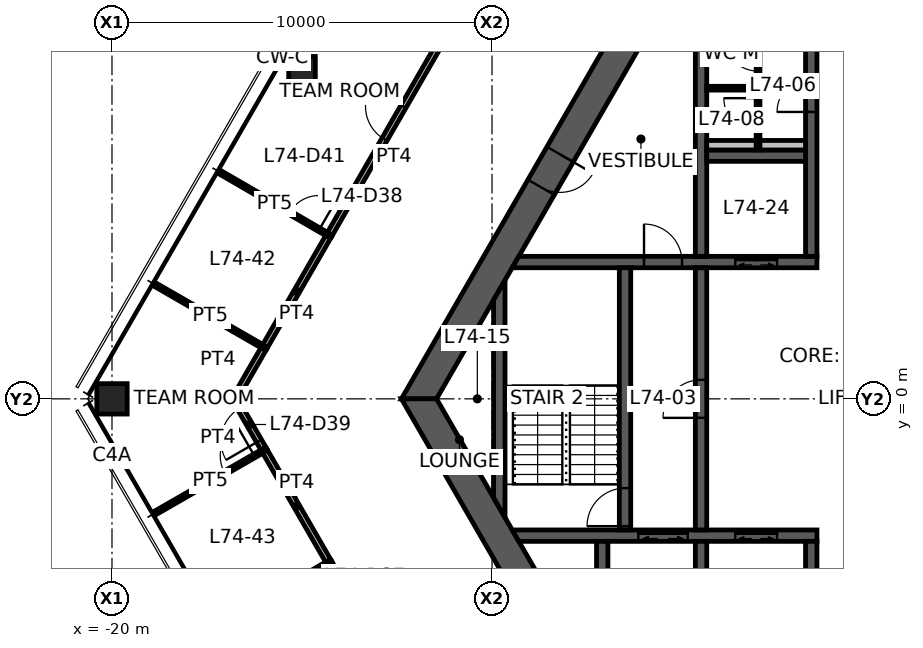
"""IFC4 building model, lengths in metres.
Left out: names, types, materials, properties, quantities, classifications, styles, units other than length and angle.
Written with IfcOpenShell. Run it as: python <this file> out.ifc"""

import sys

from ifc_helpers import new_model, si_unit, direction, frame, frame_2d, origin, origin_2d, place, context, subcontext, project, spatial, polyline, rectangle, hollow_rectangle, outline, extrude, element, fill, save


model = new_model("IFC4")
c1 = context("Model", 3, precision=1e-05, world=origin(), true_north=direction((0.0, 1.0)))
c2 = subcontext(c1, "Body", "Model", "MODEL_VIEW")
j1 = project(units=[si_unit("LENGTHUNIT", "METRE"), si_unit("PLANEANGLEUNIT", "RADIAN")], contexts=[c1])
p1 = place(None, origin())
s1 = spatial("IfcSite", under=j1, at=p1, CompositionType="ELEMENT")
p2 = place(p1, origin())
s2 = spatial("IfcBuilding", under=s1, at=p2, CompositionType="ELEMENT")
p3 = place(p2, frame((0.0, 0.0, 294.7)))
s3 = spatial("IfcBuildingStorey", under=s2, at=p3, CompositionType="ELEMENT", Elevation=294.7)
p4 = place(p3, frame((-20.0, 0.0, 0.0), z_axis=(0.0, 0.0, 1.0), x_axis=(1.0, 0.0, 0.0)))
e1 = element("IfcColumn", 1, at=p4, inside=s3, PredefinedType="COLUMN", context=c2, shape_type="SweptSolid", body=[
    extrude(hollow_rectangle(XDim=0.8, YDim=0.8, WallThickness=0.04, at=origin_2d()), origin(), (0.0, 0.0, 1.0), 3.9),
])
p5 = place(p3, frame((-15.0, 8.66, 0.0), z_axis=(0.0, 0.0, 1.0), x_axis=(1.0, 0.0, 0.0)))
e2 = element("IfcColumn", 2, at=p5, inside=s3, PredefinedType="COLUMN", context=c2, shape_type="SweptSolid", body=[
    extrude(hollow_rectangle(XDim=0.7, YDim=0.7, WallThickness=0.032, at=origin_2d()), origin(), (0.0, 0.0, 1.0), 3.9),
])
p6 = place(p3, frame((-5.961, 10.325, 0.0), z_axis=(0.0, 0.0, 1.0), x_axis=(-0.500004296715, -0.866022923061, 0.0)))
e3 = element("IfcWall", 3, at=p6, inside=s3, PredefinedType="SHEAR", context=c2, shape_type="SweptSolid", body=[
    extrude(outline(polyline([(-0.231, -0.4), (4.494, -0.4), (5.494, -0.4), (12.153, -0.4), (11.691, 0.4), (5.494, 0.4), (4.494, 0.4), (0.231, 0.4), (-0.231, -0.4)])), origin(), (0.0, 0.0, 1.0), 3.9),
])
p7 = place(p6, frame((4.494, 0.0, 0.0)))
e4 = element("IfcOpeningElement", 4, at=p7, cuts=e3, PredefinedType="OPENING", context=c2, shape_type="SweptSolid", body=[
    extrude(rectangle(XDim=1.0, YDim=2.1, at=frame_2d((0.5, 1.05))), frame((0.0, 0.41, 0.0), z_axis=(0.0, -1.0, 0.0), x_axis=(1.0, 0.0, 0.0)), (0.0, 0.0, 1.0), 0.82),
])
p8 = place(p3, frame((-11.922, 0.0, 0.0), z_axis=(0.0, 0.0, 1.0), x_axis=(0.500004296715, -0.866022923061, 0.0)))
e5 = element("IfcWall", 5, at=p8, inside=s3, PredefinedType="SHEAR", context=c2, shape_type="SweptSolid", body=[
    extrude(outline(polyline([(-0.231, -0.4), (6.281, -0.4), (7.081, -0.4), (12.153, -0.4), (11.691, 0.4), (7.081, 0.4), (6.281, 0.4), (0.231, 0.4), (-0.231, -0.4)])), origin(), (0.0, 0.0, 1.0), 3.9),
])
p9 = place(p8, frame((6.281, 0.0, 0.0)))
e6 = element("IfcOpeningElement", 6, at=p9, cuts=e5, PredefinedType="OPENING", context=c2, shape_type="SweptSolid", body=[
    extrude(rectangle(XDim=0.8, YDim=2.1, at=frame_2d((0.4, 1.05))), frame((0.0, 0.41, 0.0), z_axis=(0.0, -1.0, 0.0), x_axis=(1.0, 0.0, 0.0)), (0.0, 0.0, 1.0), 0.82),
])
p10 = place(p3, frame((-9.382, 3.6, 0.0), z_axis=(0.0, 0.0, 1.0), x_axis=(1.0, 0.0, 0.0)))
e7 = element("IfcWall", 7, at=p10, inside=s3, PredefinedType="SHEAR", context=c2, shape_type="SweptSolid", body=[
    extrude(outline(polyline([(-0.087, -0.15), (3.382, -0.15), (4.382, -0.15), (5.782, -0.15), (6.882, -0.15), (7.932, -0.15), (7.932, 0.15), (6.882, 0.15), (5.782, 0.15), (4.382, 0.15), (3.382, 0.15), (0.087, 0.15), (-0.087, -0.15)])), origin(), (0.0, 0.0, 1.0), 3.9),
])
p11 = place(p10, frame((3.382, 0.0, 0.0)))
e8 = element("IfcOpeningElement", 8, at=p11, cuts=e7, PredefinedType="OPENING", context=c2, shape_type="SweptSolid", body=[
    extrude(rectangle(XDim=1.0, YDim=2.1, at=frame_2d((0.5, 1.05))), frame((0.0, 0.16, 0.0), z_axis=(0.0, -1.0, 0.0), x_axis=(1.0, 0.0, 0.0)), (0.0, 0.0, 1.0), 0.32),
])
p12 = place(p10, frame((5.782, 0.0, 0.0)))
e9 = element("IfcOpeningElement", 9, at=p12, cuts=e7, PredefinedType="OPENING", context=c2, shape_type="SweptSolid", body=[
    extrude(rectangle(XDim=1.1, YDim=2.1, at=frame_2d((0.55, 1.05))), frame((0.0, 0.16, 0.0), z_axis=(0.0, -1.0, 0.0), x_axis=(1.0, 0.0, 0.0)), (0.0, 0.0, 1.0), 0.32),
])
p13 = place(p3, frame((-9.382, -3.6, 0.0), z_axis=(0.0, 0.0, 1.0), x_axis=(1.0, 0.0, 0.0)))
e10 = element("IfcWall", 10, at=p13, inside=s3, PredefinedType="SHEAR", context=c2, shape_type="SweptSolid", body=[
    extrude(outline(polyline([(0.087, -0.15), (3.232, -0.15), (4.532, -0.15), (5.782, -0.15), (6.882, -0.15), (7.932, -0.15), (7.932, 0.15), (6.882, 0.15), (5.782, 0.15), (4.532, 0.15), (3.232, 0.15), (-0.087, 0.15), (0.087, -0.15)])), origin(), (0.0, 0.0, 1.0), 3.9),
])
p14 = place(p13, frame((5.782, 0.0, 0.0)))
e11 = element("IfcOpeningElement", 11, at=p14, cuts=e10, PredefinedType="OPENING", context=c2, shape_type="SweptSolid", body=[
    extrude(rectangle(XDim=1.1, YDim=2.1, at=frame_2d((0.55, 1.05))), frame((0.0, 0.16, 0.0), z_axis=(0.0, -1.0, 0.0), x_axis=(1.0, 0.0, 0.0)), (0.0, 0.0, 1.0), 0.32),
])
p15 = place(p13, frame((3.232, 0.0, 0.0)))
e12 = element("IfcOpeningElement", 12, at=p15, cuts=e10, PredefinedType="OPENING", context=c2, shape_type="SweptSolid", body=[
    extrude(rectangle(XDim=1.3, YDim=2.1, at=frame_2d((0.65, 1.05))), frame((0.0, 0.16, 0.0), z_axis=(0.0, -1.0, 0.0), x_axis=(1.0, 0.0, 0.0)), (0.0, 0.0, 1.0), 0.32),
])
p16 = place(p3, frame((-1.6, 3.75, 0.0), z_axis=(0.0, 0.0, 1.0), x_axis=(0.0, 1.0, 0.0)))
e13 = element("IfcWall", 13, at=p16, inside=s3, PredefinedType="SHEAR", context=c2, shape_type="SweptSolid", body=[
    extrude(rectangle(XDim=6.175, YDim=0.3, at=frame_2d((3.087, 0.0))), origin(), (0.0, 0.0, 1.0), 3.9),
])
p17 = place(p16, frame((3.8, 0.0, 0.0)))
e14 = element("IfcOpeningElement", 14, at=p17, cuts=e13, PredefinedType="OPENING", context=c2, shape_type="SweptSolid", body=[
    extrude(rectangle(XDim=0.9, YDim=2.1, at=frame_2d((0.45, 1.05))), frame((0.0, 0.16, 0.0), z_axis=(0.0, -1.0, 0.0), x_axis=(1.0, 0.0, 0.0)), (0.0, 0.0, 1.0), 0.32),
])
p18 = place(p3, frame((-1.6, -3.75, 0.0), z_axis=(0.0, 0.0, 1.0), x_axis=(0.0, -1.0, 0.0)))
e15 = element("IfcWall", 15, at=p18, inside=s3, PredefinedType="SHEAR", context=c2, shape_type="SweptSolid", body=[
    extrude(rectangle(XDim=6.175, YDim=0.3, at=frame_2d((3.087, 0.0))), origin(), (0.0, 0.0, 1.0), 3.9),
])
p19 = place(p18, frame((3.8, 0.0, 0.0)))
e16 = element("IfcOpeningElement", 16, at=p19, cuts=e15, PredefinedType="OPENING", context=c2, shape_type="SweptSolid", body=[
    extrude(rectangle(XDim=0.9, YDim=2.1, at=frame_2d((0.45, 1.05))), frame((0.0, 0.16, 0.0), z_axis=(0.0, -1.0, 0.0), x_axis=(1.0, 0.0, 0.0)), (0.0, 0.0, 1.0), 0.32),
])
p20 = place(p3, frame((-4.5, -3.45, 0.0), z_axis=(0.0, 0.0, 1.0), x_axis=(0.0, 1.0, 0.0)))
e17 = element("IfcWall", 17, at=p20, inside=s3, PredefinedType="SHEAR", context=c2, shape_type="SweptSolid", body=[
    extrude(rectangle(XDim=6.9, YDim=0.3, at=frame_2d((3.45, 0.0))), origin(), (0.0, 0.0, 1.0), 3.9),
])
p21 = place(p20, frame((2.95, 0.0, 0.0)))
e18 = element("IfcOpeningElement", 18, at=p21, cuts=e17, PredefinedType="OPENING", context=c2, shape_type="SweptSolid", body=[
    extrude(rectangle(XDim=1.0, YDim=2.1, at=frame_2d((0.5, 1.05))), frame((0.0, 0.16, 0.0), z_axis=(0.0, -1.0, 0.0), x_axis=(1.0, 0.0, 0.0)), (0.0, 0.0, 1.0), 0.32),
])
p22 = place(p3, frame((-6.5, -3.45, 0.0), z_axis=(0.0, 0.0, 1.0), x_axis=(0.0, 1.0, 0.0)))
e19 = element("IfcWall", 19, at=p22, inside=s3, PredefinedType="SHEAR", context=c2, shape_type="SweptSolid", body=[
    extrude(rectangle(XDim=6.9, YDim=0.3, at=frame_2d((3.45, 0.0))), origin(), (0.0, 0.0, 1.0), 3.9),
])
p23 = place(p22, frame((0.1, 0.0, 0.0)))
e20 = element("IfcOpeningElement", 20, at=p23, cuts=e19, PredefinedType="OPENING", context=c2, shape_type="SweptSolid", body=[
    extrude(rectangle(XDim=1.0, YDim=2.1, at=frame_2d((0.5, 1.05))), frame((0.0, 0.16, 0.0), z_axis=(0.0, -1.0, 0.0), x_axis=(1.0, 0.0, 0.0)), (0.0, 0.0, 1.0), 0.32),
])
for number, where, z_axis, x_axis in (
    (21, (-4.5, 3.75, 0.0), (0.0, 0.0, 1.0), (0.0, 1.0, 0.0)),
    (22, (-4.5, -3.75, 0.0), (0.0, 0.0, 1.0), (0.0, -1.0, 0.0)),
):
    element("IfcWall", number, at=place(p3, frame(where, z_axis=z_axis, x_axis=x_axis)), inside=s3, PredefinedType="SHEAR", context=c2, shape_type="SweptSolid", body=[
        extrude(rectangle(XDim=6.175, YDim=0.3, at=frame_2d((3.087, 0.0))), origin(), (0.0, 0.0, 1.0), 3.9),
    ])
p24 = place(p3, frame((-4.35, 6.4, 0.0), z_axis=(0.0, 0.0, 1.0), x_axis=(1.0, 0.0, 0.0)))
e23 = element("IfcWall", 23, at=p24, inside=s3, PredefinedType="SHEAR", context=c2, shape_type="SweptSolid", body=[
    extrude(rectangle(XDim=2.6, YDim=0.3, at=frame_2d((1.3, 0.0))), origin(), (0.0, 0.0, 1.0), 3.9),
])
p25 = place(p3, frame((-7.1, -3.75, 0.0), z_axis=(0.0, 0.0, 1.0), x_axis=(0.0, -1.0, 0.0)))
e24 = element("IfcWall", 24, at=p25, inside=s3, PredefinedType="SHEAR", context=c2, shape_type="SweptSolid", body=[
    extrude(rectangle(XDim=3.1, YDim=0.3, at=frame_2d((1.55, 0.0))), origin(), (0.0, 0.0, 1.0), 3.9),
])
p26 = place(p3, frame((-9.808, -2.862, 0.0), z_axis=(0.0, 0.0, 1.0), x_axis=(0.0, 1.0, 0.0)))
e25 = element("IfcWall", 25, at=p26, inside=s3, PredefinedType="SHEAR", context=c2, shape_type="SweptSolid", body=[
    extrude(outline(polyline([(-0.26, -0.15), (5.984, -0.15), (5.465, 0.15), (0.26, 0.15), (-0.26, -0.15)])), origin(), (0.0, 0.0, 1.0), 3.9),
])
p27 = place(p3, frame((-4.35, 6.675, 0.0), z_axis=(0.0, 0.0, 1.0), x_axis=(1.0, 0.0, 0.0)))
e26 = element("IfcWall", 26, at=p27, inside=s3, PredefinedType="PLUMBINGWALL", context=c2, shape_type="SweptSolid", body=[
    extrude(rectangle(XDim=2.6, YDim=0.25, at=frame_2d((1.3, 0.0))), origin(), (0.0, 0.0, 1.0), 3.9),
])
p28 = place(p3, frame((-3.0, 6.55, 0.0), z_axis=(0.0, 0.0, 1.0), x_axis=(0.0, 1.0, 0.0)))
e27 = element("IfcWall", 27, at=p28, inside=s3, PredefinedType="PARTITIONING", context=c2, shape_type="SweptSolid", body=[
    extrude(rectangle(XDim=3.375, YDim=0.1, at=frame_2d((1.688, 0.0))), origin(), (0.0, 0.0, 1.0), 2.95),
])
p29 = place(p28, frame((2.075, 0.0, 0.0)))
e28 = element("IfcOpeningElement", 28, at=p29, cuts=e27, PredefinedType="OPENING", context=c2, shape_type="SweptSolid", body=[
    extrude(rectangle(XDim=0.9, YDim=2.1, at=frame_2d((0.45, 1.05))), frame((0.0, 0.06, 0.0), z_axis=(0.0, -1.0, 0.0), x_axis=(1.0, 0.0, 0.0)), (0.0, 0.0, 1.0), 0.12),
])
p30 = place(p28, frame((0.462, 0.0, 0.0)))
e29 = element("IfcOpeningElement", 29, at=p30, cuts=e27, PredefinedType="OPENING", context=c2, shape_type="SweptSolid", body=[
    extrude(rectangle(XDim=0.9, YDim=2.1, at=frame_2d((0.45, 1.05))), frame((0.0, 0.06, 0.0), z_axis=(0.0, -1.0, 0.0), x_axis=(1.0, 0.0, 0.0)), (0.0, 0.0, 1.0), 0.12),
])
p31 = place(p3, frame((-3.05, 8.175, 0.0), z_axis=(0.0, 0.0, 1.0), x_axis=(-1.0, 0.0, 0.0)))
e30 = element("IfcWall", 30, at=p31, inside=s3, PredefinedType="PARTITIONING", context=c2, shape_type="SweptSolid", body=[
    extrude(rectangle(XDim=1.3, YDim=0.1, at=frame_2d((0.65, 0.0))), origin(), (0.0, 0.0, 1.0), 2.95),
])
for number, where, z_axis, x_axis in (
    (31, (-15.997, 1.342, 0.0), (0.0, 0.0, 1.0), (0.5, 0.866, 0.0)),
    (32, (-14.284, -4.309, 0.0), (0.0, 0.0, 1.0), (-0.5, 0.866, 0.0)),
):
    element("IfcWall", number, at=place(p3, frame(where, z_axis=z_axis, x_axis=x_axis)), inside=s3, PredefinedType="PARTITIONING", context=c2, shape_type="SweptSolid", body=[
        extrude(rectangle(XDim=3.426, YDim=0.15, at=frame_2d((1.713, 0.0))), origin(), (0.0, 0.0, 1.0), 2.95),
    ])
p32 = place(p3, frame((-12.739, -6.985, 0.0), z_axis=(0.0, 0.0, 1.0), x_axis=(-0.500017819788, 0.86601511528, 0.0)))
e33 = element("IfcWall", 33, at=p32, inside=s3, PredefinedType="PARTITIONING", context=c2, shape_type="SweptSolid", body=[
    extrude(rectangle(XDim=3.101, YDim=0.15, at=frame_2d((1.55, 0.0))), origin(), (0.0, 0.0, 1.0), 2.95),
])
p33 = place(p32, frame((0.3, 0.0, 0.0)))
e34 = element("IfcOpeningElement", 34, at=p33, cuts=e33, PredefinedType="OPENING", context=c2, shape_type="SweptSolid", body=[
    extrude(rectangle(XDim=0.9, YDim=2.1, at=frame_2d((0.45, 1.05))), frame((0.0, 0.085, 0.0), z_axis=(0.0, -1.0, 0.0), x_axis=(1.0, 0.0, 0.0)), (0.0, 0.0, 1.0), 0.17),
])
p34 = place(p3, frame((-14.289, 4.301, 0.0), z_axis=(0.0, 0.0, 1.0), x_axis=(0.500020088259, 0.866013805512, 0.0)))
e35 = element("IfcWall", 35, at=p34, inside=s3, PredefinedType="PARTITIONING", context=c2, shape_type="SweptSolid", body=[
    extrude(rectangle(XDim=6.84, YDim=0.15, at=frame_2d((3.42, 0.0))), origin(), (0.0, 0.0, 1.0), 2.95),
])
p35 = place(p34, frame((2.92, 0.0, 0.0)))
e36 = element("IfcOpeningElement", 36, at=p35, cuts=e35, PredefinedType="OPENING", context=c2, shape_type="SweptSolid", body=[
    extrude(rectangle(XDim=1.0, YDim=2.1, at=frame_2d((0.5, 1.05))), frame((0.0, 0.085, 0.0), z_axis=(0.0, -1.0, 0.0), x_axis=(1.0, 0.0, 0.0)), (0.0, 0.0, 1.0), 0.17),
])
p36 = place(p3, frame((-16.772, 0.0, 0.0), z_axis=(0.0, 0.0, 1.0), x_axis=(0.500011542666, 0.866018739521, 0.0)))
e37 = element("IfcWall", 37, at=p36, inside=s3, PredefinedType="PARTITIONING", context=c2, shape_type="SweptSolid", body=[
    extrude(rectangle(XDim=1.56, YDim=0.15, at=frame_2d((0.78, 0.0))), origin(), (0.0, 0.0, 1.0), 2.95),
])
p37 = place(p3, frame((-15.992, -1.351, 0.0), z_axis=(0.0, 0.0, 1.0), x_axis=(-0.500011542666, 0.866018739521, 0.0)))
e38 = element("IfcWall", 38, at=p37, inside=s3, PredefinedType="PARTITIONING", context=c2, shape_type="SweptSolid", body=[
    extrude(rectangle(XDim=1.56, YDim=0.15, at=frame_2d((0.78, 0.0))), origin(), (0.0, 0.0, 1.0), 2.95),
])
p38 = place(p37, frame((0.28, 0.0, 0.0)))
e39 = element("IfcOpeningElement", 39, at=p38, cuts=e38, PredefinedType="OPENING", context=c2, shape_type="SweptSolid", body=[
    extrude(rectangle(XDim=1.0, YDim=2.1, at=frame_2d((0.5, 1.05))), frame((0.0, 0.085, 0.0), z_axis=(0.0, -1.0, 0.0), x_axis=(1.0, 0.0, 0.0)), (0.0, 0.0, 1.0), 0.17),
])
p39 = place(p3, frame((-17.154, 5.96, 0.0), z_axis=(0.0, 0.0, 1.0), x_axis=(0.865342122637, -0.501181614577, 0.0)))
e40 = element("IfcWall", 40, at=p39, inside=s3, PredefinedType="PARTITIONING", context=c2, shape_type="SweptSolid", body=[
    extrude(rectangle(XDim=3.311, YDim=0.1, at=frame_2d((1.655, 0.0))), origin(), (0.0, 0.0, 1.0), 2.95),
])
p40 = place(p39, frame((2.111, 0.0, 0.0)))
e41 = element("IfcOpeningElement", 41, at=p40, cuts=e40, PredefinedType="OPENING", context=c2, shape_type="SweptSolid", body=[
    extrude(rectangle(XDim=0.9, YDim=2.1, at=frame_2d((0.45, 1.05))), frame((0.0, 0.06, 0.0), z_axis=(0.0, -1.0, 0.0), x_axis=(1.0, 0.0, 0.0)), (0.0, 0.0, 1.0), 0.12),
])
p41 = place(p3, frame((-15.992, 1.351, 0.0), z_axis=(0.0, 0.0, 1.0), x_axis=(-0.866707153418, 0.498817311462, 0.0)))
e42 = element("IfcWall", 42, at=p41, inside=s3, PredefinedType="PARTITIONING", context=c2, shape_type="SweptSolid", body=[
    extrude(rectangle(XDim=3.286, YDim=0.1, at=frame_2d((1.643, 0.0))), origin(), (0.0, 0.0, 1.0), 2.95),
])
p42 = place(p3, frame((-14.289, -4.3, 0.0), z_axis=(0.0, 0.0, 1.0), x_axis=(-0.865245913684, -0.501347692578, 0.0)))
e43 = element("IfcWall", 43, at=p42, inside=s3, PredefinedType="PARTITIONING", context=c2, shape_type="SweptSolid", body=[
    extrude(rectangle(XDim=3.275, YDim=0.1, at=frame_2d((1.638, 0.0))), origin(), (0.0, 0.0, 1.0), 2.95),
])
p43 = place(p3, frame((-18.84, -2.99, 0.0), z_axis=(0.0, 0.0, 1.0), x_axis=(0.866707153418, 0.498817311462, 0.0)))
e44 = element("IfcWall", 44, at=p43, inside=s3, PredefinedType="PARTITIONING", context=c2, shape_type="SweptSolid", body=[
    extrude(rectangle(XDim=3.286, YDim=0.1, at=frame_2d((1.643, 0.0))), origin(), (0.0, 0.0, 1.0), 2.95),
])
p44 = place(p43, frame((2.086, 0.0, 0.0)))
e45 = element("IfcOpeningElement", 45, at=p44, cuts=e44, PredefinedType="OPENING", context=c2, shape_type="SweptSolid", body=[
    extrude(rectangle(XDim=0.9, YDim=2.1, at=frame_2d((0.45, 1.05))), frame((0.0, 0.06, 0.0), z_axis=(0.0, -1.0, 0.0), x_axis=(1.0, 0.0, 0.0)), (0.0, 0.0, 1.0), 0.12),
])
p45 = place(p7, origin())
e46 = element("IfcDoor", 46, at=p45, inside=s3, OperationType="SINGLE_SWING_LEFT", PredefinedType="DOOR", context=c2, shape_type="SweptSolid", body=[
    extrude(rectangle(XDim=1.0, YDim=2.1, at=frame_2d((0.5, 1.05))), frame((0.0, 0.025, 0.0), z_axis=(0.0, -1.0, 0.0), x_axis=(1.0, 0.0, 0.0)), (0.0, 0.0, 1.0), 0.05),
])
fill(e4, e46)
p46 = place(p21, origin())
e47 = element("IfcDoor", 47, at=p46, inside=s3, OperationType="SINGLE_SWING_LEFT", PredefinedType="DOOR", context=c2, shape_type="SweptSolid", body=[
    extrude(rectangle(XDim=1.0, YDim=2.1, at=frame_2d((0.5, 1.05))), frame((0.0, 0.025, 0.0), z_axis=(0.0, -1.0, 0.0), x_axis=(1.0, 0.0, 0.0)), (0.0, 0.0, 1.0), 0.05),
])
fill(e18, e47)
p47 = place(p23, origin())
e48 = element("IfcDoor", 48, at=p47, inside=s3, OperationType="SINGLE_SWING_LEFT", PredefinedType="DOOR", context=c2, shape_type="SweptSolid", body=[
    extrude(rectangle(XDim=1.0, YDim=2.1, at=frame_2d((0.5, 1.05))), frame((0.0, 0.025, 0.0), z_axis=(0.0, -1.0, 0.0), x_axis=(1.0, 0.0, 0.0)), (0.0, 0.0, 1.0), 0.05),
])
fill(e20, e48)
p48 = place(p11, origin())
e49 = element("IfcDoor", 49, at=p48, inside=s3, OperationType="SINGLE_SWING_LEFT", PredefinedType="DOOR", context=c2, shape_type="SweptSolid", body=[
    extrude(rectangle(XDim=1.0, YDim=2.1, at=frame_2d((0.5, 1.05))), frame((0.0, 0.025, 0.0), z_axis=(0.0, -1.0, 0.0), x_axis=(1.0, 0.0, 0.0)), (0.0, 0.0, 1.0), 0.05),
])
fill(e8, e49)
p49 = place(p17, origin())
e50 = element("IfcDoor", 50, at=p49, inside=s3, OperationType="SINGLE_SWING_LEFT", PredefinedType="DOOR", context=c2, shape_type="SweptSolid", body=[
    extrude(rectangle(XDim=0.9, YDim=2.1, at=frame_2d((0.45, 1.05))), frame((0.0, 0.025, 0.0), z_axis=(0.0, -1.0, 0.0), x_axis=(1.0, 0.0, 0.0)), (0.0, 0.0, 1.0), 0.05),
])
fill(e14, e50)
p50 = place(p29, origin())
e51 = element("IfcDoor", 51, at=p50, inside=s3, OperationType="SINGLE_SWING_RIGHT", PredefinedType="DOOR", context=c2, shape_type="SweptSolid", body=[
    extrude(rectangle(XDim=0.9, YDim=2.1, at=frame_2d((0.45, 1.05))), frame((0.0, 0.025, 0.0), z_axis=(0.0, -1.0, 0.0), x_axis=(1.0, 0.0, 0.0)), (0.0, 0.0, 1.0), 0.05),
])
fill(e28, e51)
p51 = place(p30, origin())
e52 = element("IfcDoor", 52, at=p51, inside=s3, OperationType="SINGLE_SWING_RIGHT", PredefinedType="DOOR", context=c2, shape_type="SweptSolid", body=[
    extrude(rectangle(XDim=0.9, YDim=2.1, at=frame_2d((0.45, 1.05))), frame((0.0, 0.025, 0.0), z_axis=(0.0, -1.0, 0.0), x_axis=(1.0, 0.0, 0.0)), (0.0, 0.0, 1.0), 0.05),
])
fill(e29, e52)
p52 = place(p35, origin())
e53 = element("IfcDoor", 53, at=p52, inside=s3, OperationType="SINGLE_SWING_RIGHT", PredefinedType="DOOR", context=c2, shape_type="SweptSolid", body=[
    extrude(rectangle(XDim=1.0, YDim=2.1, at=frame_2d((0.5, 1.05))), frame((0.0, 0.025, 0.0), z_axis=(0.0, -1.0, 0.0), x_axis=(1.0, 0.0, 0.0)), (0.0, 0.0, 1.0), 0.05),
])
fill(e36, e53)
p53 = place(p38, origin())
e54 = element("IfcDoor", 54, at=p53, inside=s3, OperationType="SINGLE_SWING_LEFT", PredefinedType="DOOR", context=c2, shape_type="SweptSolid", body=[
    extrude(rectangle(XDim=1.0, YDim=2.1, at=frame_2d((0.5, 1.05))), frame((0.0, 0.025, 0.0), z_axis=(0.0, -1.0, 0.0), x_axis=(1.0, 0.0, 0.0)), (0.0, 0.0, 1.0), 0.05),
])
fill(e39, e54)
p54 = place(p40, origin())
e55 = element("IfcDoor", 55, at=p54, inside=s3, OperationType="SINGLE_SWING_RIGHT", PredefinedType="DOOR", context=c2, shape_type="SweptSolid", body=[
    extrude(rectangle(XDim=0.9, YDim=2.1, at=frame_2d((0.45, 1.05))), frame((0.0, 0.025, 0.0), z_axis=(0.0, -1.0, 0.0), x_axis=(1.0, 0.0, 0.0)), (0.0, 0.0, 1.0), 0.05),
])
fill(e41, e55)
p55 = place(p44, origin())
e56 = element("IfcDoor", 56, at=p55, inside=s3, OperationType="SINGLE_SWING_RIGHT", PredefinedType="DOOR", context=c2, shape_type="SweptSolid", body=[
    extrude(rectangle(XDim=0.9, YDim=2.1, at=frame_2d((0.45, 1.05))), frame((0.0, 0.025, 0.0), z_axis=(0.0, -1.0, 0.0), x_axis=(1.0, 0.0, 0.0)), (0.0, 0.0, 1.0), 0.05),
])
fill(e45, e56)
p56 = place(p12, origin())
e57 = element("IfcDoor", 57, at=p56, inside=s3, OperationType="DOUBLE_DOOR_SLIDING", PredefinedType="DOOR", context=c2, shape_type="SweptSolid", body=[
    extrude(rectangle(XDim=1.1, YDim=2.1, at=frame_2d((0.55, 1.05))), frame((0.0, 0.025, 0.0), z_axis=(0.0, -1.0, 0.0), x_axis=(1.0, 0.0, 0.0)), (0.0, 0.0, 1.0), 0.05),
])
fill(e9, e57)
p57 = place(p14, origin())
e58 = element("IfcDoor", 58, at=p57, inside=s3, OperationType="DOUBLE_DOOR_SLIDING", PredefinedType="DOOR", context=c2, shape_type="SweptSolid", body=[
    extrude(rectangle(XDim=1.1, YDim=2.1, at=frame_2d((0.55, 1.05))), frame((0.0, 0.025, 0.0), z_axis=(0.0, -1.0, 0.0), x_axis=(1.0, 0.0, 0.0)), (0.0, 0.0, 1.0), 0.05),
])
fill(e11, e58)
p58 = place(p15, origin())
e59 = element("IfcDoor", 59, at=p58, inside=s3, OperationType="DOUBLE_DOOR_SLIDING", PredefinedType="DOOR", context=c2, shape_type="SweptSolid", body=[
    extrude(rectangle(XDim=1.3, YDim=2.1, at=frame_2d((0.65, 1.05))), frame((0.0, 0.025, 0.0), z_axis=(0.0, -1.0, 0.0), x_axis=(1.0, 0.0, 0.0)), (0.0, 0.0, 1.0), 0.05),
])
fill(e12, e59)
save(model, sys.argv[1])
